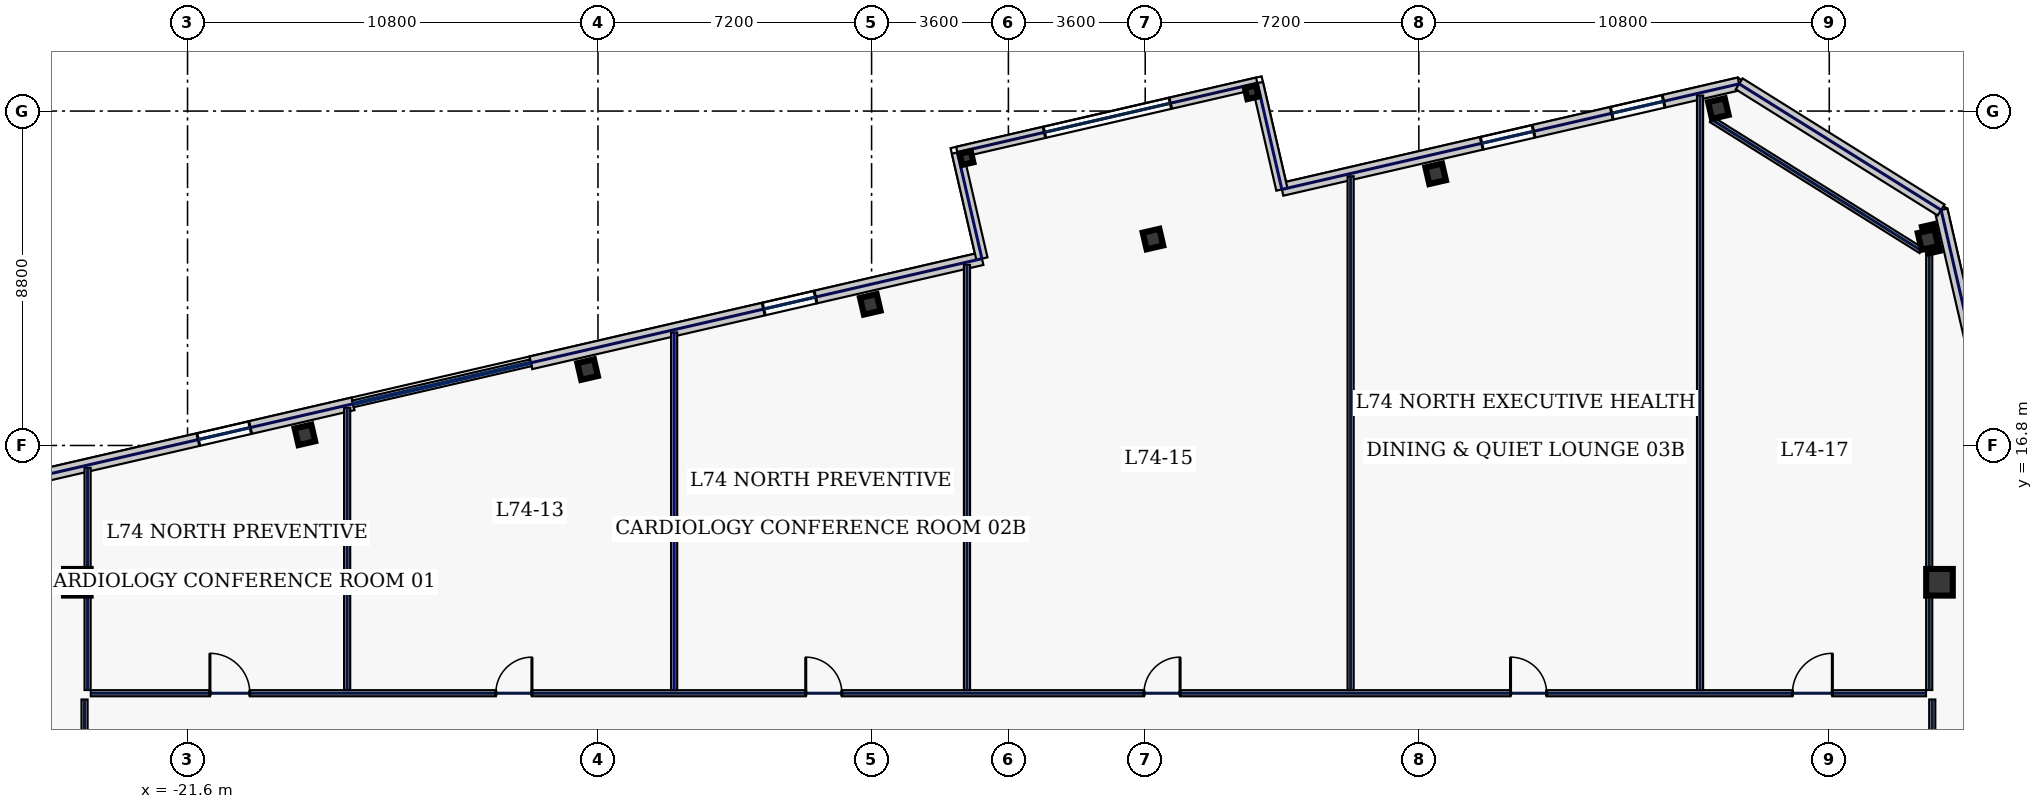
"""IFC4 building model, lengths in metres.
Left out: names, types, materials, properties, quantities, classifications, styles, units other than length and angle.
Written with IfcOpenShell. Run it as: python <this file> out.ifc"""

import sys

from ifc_helpers import new_model, si_unit, direction, frame, frame_2d, origin, origin_2d, place, context, subcontext, project, spatial, rectangle, hollow_rectangle, extrude, element, fill, save


model = new_model("IFC4")
c1 = context("Model", 3, precision=1e-05, world=origin(), true_north=direction((0.0, 1.0)))
c2 = subcontext(c1, "Body", "Model", "MODEL_VIEW")
j1 = project(units=[si_unit("LENGTHUNIT", "METRE"), si_unit("PLANEANGLEUNIT", "RADIAN")], contexts=[c1])
p1 = place(None, origin())
s1 = spatial("IfcSite", under=j1, at=p1, CompositionType="ELEMENT")
p2 = place(p1, origin())
s2 = spatial("IfcBuilding", under=s1, at=p2, CompositionType="ELEMENT")
p3 = place(p2, frame((0.0, 0.0, 317.0)))
s3 = spatial("IfcBuildingStorey", under=s2, at=p3, CompositionType="ELEMENT", Elevation=317.0)
for number, where, z_axis, x_axis in (
    (1, (-24.5, 13.2, 0.0), (0.0, 0.0, 1.0), (1.0, 0.0, 0.0)),
    (2, (24.5, 13.2, 0.0), (0.0, 0.0, 1.0), (1.0, 0.0, 0.0)),
):
    element("IfcColumn", number, at=place(p3, frame(where, z_axis=z_axis, x_axis=x_axis)), inside=s3, PredefinedType="COLUMN", context=c2, shape_type="SweptSolid", body=[
        extrude(hollow_rectangle(XDim=0.7, YDim=0.7, WallThickness=0.032, at=origin_2d()), origin(), (0.0, 0.0, 1.0), 3.74),
    ])
for number, where, z_axis, x_axis in (
    (3, (18.682, 25.666, 0.0), (0.0, 0.0, 1.0), (0.974, 0.225, 0.0)),
    (4, (11.243, 23.949, 0.0), (0.0, 0.0, 1.0), (0.974, 0.225, 0.0)),
    (5, (3.804, 22.232, 0.0), (0.0, 0.0, 1.0), (0.974, 0.225, 0.0)),
    (6, (-3.634, 20.514, 0.0), (0.0, 0.0, 1.0), (0.974, 0.225, 0.0)),
    (7, (-11.073, 18.797, 0.0), (0.0, 0.0, 1.0), (0.974, 0.225, 0.0)),
    (8, (-18.511, 17.08, 0.0), (0.0, 0.0, 1.0), (0.974, 0.225, 0.0)),
    (9, (24.198, 22.219, 0.0), (0.0, 0.0, 1.0), (0.974, 0.225, 0.0)),
):
    element("IfcColumn", number, at=place(p3, frame(where, z_axis=z_axis, x_axis=x_axis)), inside=s3, PredefinedType="COLUMN", context=c2, shape_type="SweptSolid", body=[
        extrude(hollow_rectangle(XDim=0.45, YDim=0.45, WallThickness=0.022, at=origin_2d()), origin(), (0.0, 0.0, 1.0), 3.74),
    ])
for number, where, z_axis, x_axis in (
    (10, (-1.102, 24.363, 0.0), (0.0, 0.0, 1.0), (0.974, 0.225, 0.0)),
    (11, (6.401, 26.095, 0.0), (0.0, 0.0, 1.0), (0.974, 0.225, 0.0)),
):
    element("IfcColumn", number, at=place(p3, frame(where, z_axis=z_axis, x_axis=x_axis)), inside=s3, PredefinedType="COLUMN", context=c2, shape_type="SweptSolid", body=[
        extrude(hollow_rectangle(XDim=0.3, YDim=0.3, WallThickness=0.016, at=origin_2d()), origin(), (0.0, 0.0, 1.0), 3.74),
    ])
p4 = place(p3, frame((19.229, 26.316, 0.0), z_axis=(0.0, 0.0, 1.0), x_axis=(-0.974371201193, -0.224946131964, 0.0)))
e12 = element("IfcWall", 12, at=p4, inside=s3, PredefinedType="STANDARD", context=c2, shape_type="SweptSolid", body=[
    extrude(rectangle(XDim=12.35, YDim=0.34, at=frame_2d((6.175, 0.0))), origin(), (0.0, 0.0, 1.0), 3.74),
])
p5 = place(p4, frame((5.553, 0.0, 1.0)))
e13 = element("IfcOpeningElement", 13, at=p5, cuts=e12, PredefinedType="OPENING", context=c2, shape_type="SweptSolid", body=[
    extrude(rectangle(XDim=1.4, YDim=1.85, at=frame_2d((0.7, 0.925))), frame((0.0, 0.18, 0.0), z_axis=(0.0, -1.0, 0.0), x_axis=(1.0, 0.0, 0.0)), (0.0, 0.0, 1.0), 0.36),
])
p6 = place(p4, frame((2.041, 0.0, 1.0)))
e14 = element("IfcOpeningElement", 14, at=p6, cuts=e12, PredefinedType="OPENING", context=c2, shape_type="SweptSolid", body=[
    extrude(rectangle(XDim=1.4, YDim=1.85, at=frame_2d((0.7, 0.925))), frame((0.0, 0.18, 0.0), z_axis=(0.0, -1.0, 0.0), x_axis=(1.0, 0.0, 0.0)), (0.0, 0.0, 1.0), 0.36),
])
p7 = place(p3, frame((-0.696, 21.716, 0.0), z_axis=(0.0, 0.0, 1.0), x_axis=(-0.974367550465, -0.224961944785, 0.0)))
e15 = element("IfcWall", 15, at=p7, inside=s3, PredefinedType="STANDARD", context=c2, shape_type="SweptSolid", body=[
    extrude(rectangle(XDim=12.184, YDim=0.34, at=frame_2d((6.092, 0.0))), origin(), (0.0, 0.0, 1.0), 3.74),
])
p8 = place(p7, frame((4.494, 0.0, 1.0)))
e16 = element("IfcOpeningElement", 16, at=p8, cuts=e15, PredefinedType="OPENING", context=c2, shape_type="SweptSolid", body=[
    extrude(rectangle(XDim=1.4, YDim=1.85, at=frame_2d((0.7, 0.925))), frame((0.0, 0.18, 0.0), z_axis=(0.0, -1.0, 0.0), x_axis=(1.0, 0.0, 0.0)), (0.0, 0.0, 1.0), 0.36),
])
p9 = place(p3, frame((-17.245, 17.895, 0.0), z_axis=(0.0, 0.0, 1.0), x_axis=(-0.97437318493, -0.224937539085, 0.0)))
e17 = element("IfcWall", 17, at=p9, inside=s3, PredefinedType="STANDARD", context=c2, shape_type="SweptSolid", body=[
    extrude(rectangle(XDim=17.366, YDim=0.34, at=frame_2d((8.683, 0.0))), origin(), (0.0, 0.0, 1.0), 3.74),
])
p10 = place(p9, frame((13.925, 0.0, 1.0)))
e18 = element("IfcOpeningElement", 18, at=p10, cuts=e17, PredefinedType="OPENING", context=c2, shape_type="SweptSolid", body=[
    extrude(rectangle(XDim=1.4, YDim=1.85, at=frame_2d((0.7, 0.925))), frame((0.0, 0.18, 0.0), z_axis=(0.0, -1.0, 0.0), x_axis=(1.0, 0.0, 0.0)), (0.0, 0.0, 1.0), 0.36),
])
p11 = place(p9, frame((10.413, 0.0, 1.0)))
e19 = element("IfcOpeningElement", 19, at=p11, cuts=e17, PredefinedType="OPENING", context=c2, shape_type="SweptSolid", body=[
    extrude(rectangle(XDim=1.4, YDim=1.85, at=frame_2d((0.7, 0.925))), frame((0.0, 0.18, 0.0), z_axis=(0.0, -1.0, 0.0), x_axis=(1.0, 0.0, 0.0)), (0.0, 0.0, 1.0), 0.36),
])
p12 = place(p9, frame((2.779, 0.0, 1.0)))
e20 = element("IfcOpeningElement", 20, at=p12, cuts=e17, PredefinedType="OPENING", context=c2, shape_type="SweptSolid", body=[
    extrude(rectangle(XDim=1.4, YDim=1.85, at=frame_2d((0.7, 0.925))), frame((0.0, 0.18, 0.0), z_axis=(0.0, -1.0, 0.0), x_axis=(1.0, 0.0, 0.0)), (0.0, 0.0, 1.0), 0.36),
])
p13 = place(p3, frame((32.686, -12.276, 0.0), z_axis=(0.0, 0.0, 1.0), x_axis=(-0.224953091034, 0.974369594576, 0.0)))
e21 = element("IfcWall", 21, at=p13, inside=s3, PredefinedType="STANDARD", context=c2, shape_type="SweptSolid", body=[
    extrude(rectangle(XDim=36.2, YDim=0.34, at=frame_2d((18.1, 0.0))), origin(), (0.0, 0.0, 1.0), 3.74),
])
p14 = place(p13, frame((3.725, 0.0, 0.58)))
e22 = element("IfcOpeningElement", 22, at=p14, cuts=e21, PredefinedType="OPENING", context=c2, shape_type="SweptSolid", body=[
    extrude(rectangle(XDim=1.6, YDim=2.3, at=frame_2d((0.8, 1.15))), frame((0.0, 0.18, 0.0), z_axis=(0.0, -1.0, 0.0), x_axis=(1.0, 0.0, 0.0)), (0.0, 0.0, 1.0), 0.36),
])
p15 = place(p13, frame((12.775, 0.0, 0.58)))
e23 = element("IfcOpeningElement", 23, at=p15, cuts=e21, PredefinedType="OPENING", context=c2, shape_type="SweptSolid", body=[
    extrude(rectangle(XDim=1.6, YDim=2.3, at=frame_2d((0.8, 1.15))), frame((0.0, 0.18, 0.0), z_axis=(0.0, -1.0, 0.0), x_axis=(1.0, 0.0, 0.0)), (0.0, 0.0, 1.0), 0.36),
])
p16 = place(p13, frame((21.825, 0.0, 0.58)))
e24 = element("IfcOpeningElement", 24, at=p16, cuts=e21, PredefinedType="OPENING", context=c2, shape_type="SweptSolid", body=[
    extrude(rectangle(XDim=1.6, YDim=2.3, at=frame_2d((0.8, 1.15))), frame((0.0, 0.18, 0.0), z_axis=(0.0, -1.0, 0.0), x_axis=(1.0, 0.0, 0.0)), (0.0, 0.0, 1.0), 0.36),
])
p17 = place(p13, frame((30.875, 0.0, 0.58)))
e25 = element("IfcOpeningElement", 25, at=p17, cuts=e21, PredefinedType="OPENING", context=c2, shape_type="SweptSolid", body=[
    extrude(rectangle(XDim=1.6, YDim=2.3, at=frame_2d((0.8, 1.15))), frame((0.0, 0.18, 0.0), z_axis=(0.0, -1.0, 0.0), x_axis=(1.0, 0.0, 0.0)), (0.0, 0.0, 1.0), 0.36),
])
p18 = place(p3, frame((24.542, 22.996, 0.0), z_axis=(0.0, 0.0, 1.0), x_axis=(-0.848055220921, 0.529907862057, 0.0)))
e26 = element("IfcWall", 26, at=p18, inside=s3, PredefinedType="STANDARD", context=c2, shape_type="SweptSolid", body=[
    extrude(rectangle(XDim=6.265, YDim=0.34, at=frame_2d((3.132, 0.0))), origin(), (0.0, 0.0, 1.0), 3.74),
])
for number, where, z_axis, x_axis in (
    (27, (-0.696, 21.716, 0.0), (0.0, 0.0, 1.0), (-0.225, 0.974, 0.0)),
    (28, (7.196, 23.538, 0.0), (0.0, 0.0, 1.0), (-0.225, 0.974, 0.0)),
):
    element("IfcWall", number, at=place(p3, frame(where, z_axis=z_axis, x_axis=x_axis)), inside=s3, PredefinedType="STANDARD", context=c2, shape_type="SweptSolid", body=[
        extrude(rectangle(XDim=2.87, YDim=0.3, at=frame_2d((1.435, 0.0))), origin(), (0.0, 0.0, 1.0), 3.74),
    ])
p19 = place(p3, frame((-1.342, 24.512, 0.0), z_axis=(0.0, 0.0, 1.0), x_axis=(0.974371888243, 0.224943155936, 0.0)))
e29 = element("IfcWall", 29, at=p19, inside=s3, PredefinedType="STANDARD", context=c2, shape_type="SweptSolid", body=[
    extrude(rectangle(XDim=8.1, YDim=0.3, at=frame_2d((4.05, 0.0))), origin(), (0.0, 0.0, 1.0), 3.385),
])
p20 = place(p19, frame((2.35, 0.0, 0.68)))
e30 = element("IfcOpeningElement", 30, at=p20, cuts=e29, PredefinedType="OPENING", context=c2, shape_type="SweptSolid", body=[
    extrude(rectangle(XDim=3.4, YDim=2.35, at=frame_2d((1.7, 1.175))), frame((0.0, 0.16, 0.0), z_axis=(0.0, -1.0, 0.0), x_axis=(1.0, 0.0, 0.0)), (0.0, 0.0, 1.0), 0.32),
])
p21 = place(p3, frame((24.018, 21.931, 0.0), z_axis=(0.0, 0.0, 1.0), x_axis=(-0.848051009591, 0.529914601736, 0.0)))
e31 = element("IfcWall", 31, at=p21, inside=s3, PredefinedType="PARTITIONING", context=c2, shape_type="SweptSolid", body=[
    extrude(rectangle(XDim=6.505, YDim=0.16, at=frame_2d((3.253, 0.0))), origin(), (0.0, 0.0, 1.0), 3.74),
])
p22 = place(p3, frame((-24.31, -10.015, 0.0), z_axis=(0.0, 0.0, 1.0), x_axis=(0.0, 1.0, 0.0)))
e32 = element("IfcWall", 32, at=p22, inside=s3, PredefinedType="PARTITIONING", context=c2, shape_type="SweptSolid", body=[
    extrude(rectangle(XDim=20.13, YDim=0.16, at=frame_2d((10.065, 0.0))), origin(), (0.0, 0.0, 1.0), 3.74),
])
p23 = place(p22, frame((2.169, 0.0, 0.0)))
e33 = element("IfcOpeningElement", 33, at=p23, cuts=e32, PredefinedType="OPENING", context=c2, shape_type="SweptSolid", body=[
    extrude(rectangle(XDim=0.95, YDim=2.2, at=frame_2d((0.475, 1.1))), frame((0.0, 0.09, 0.0), z_axis=(0.0, -1.0, 0.0), x_axis=(1.0, 0.0, 0.0)), (0.0, 0.0, 1.0), 0.18),
])
p24 = place(p22, frame((6.4, 0.0, 0.0)))
e34 = element("IfcOpeningElement", 34, at=p24, cuts=e32, PredefinedType="OPENING", context=c2, shape_type="SweptSolid", body=[
    extrude(rectangle(XDim=0.95, YDim=2.2, at=frame_2d((0.475, 1.1))), frame((0.0, 0.09, 0.0), z_axis=(0.0, -1.0, 0.0), x_axis=(1.0, 0.0, 0.0)), (0.0, 0.0, 1.0), 0.18),
])
p25 = place(p22, frame((11.6, 0.0, 0.0)))
e35 = element("IfcOpeningElement", 35, at=p25, cuts=e32, PredefinedType="OPENING", context=c2, shape_type="SweptSolid", body=[
    extrude(rectangle(XDim=0.95, YDim=2.2, at=frame_2d((0.475, 1.1))), frame((0.0, 0.09, 0.0), z_axis=(0.0, -1.0, 0.0), x_axis=(1.0, 0.0, 0.0)), (0.0, 0.0, 1.0), 0.18),
])
p26 = place(p22, frame((17.131, 0.0, 0.0)))
e36 = element("IfcOpeningElement", 36, at=p26, cuts=e32, PredefinedType="OPENING", context=c2, shape_type="SweptSolid", body=[
    extrude(rectangle(XDim=0.95, YDim=2.2, at=frame_2d((0.475, 1.1))), frame((0.0, 0.09, 0.0), z_axis=(0.0, -1.0, 0.0), x_axis=(1.0, 0.0, 0.0)), (0.0, 0.0, 1.0), 0.18),
])
p27 = place(p3, frame((-24.145, 10.28, 0.0), z_axis=(0.0, 0.0, 1.0), x_axis=(1.0, 0.0, 0.0)))
e37 = element("IfcWall", 37, at=p27, inside=s3, PredefinedType="PARTITIONING", context=c2, shape_type="SweptSolid", body=[
    extrude(rectangle(XDim=48.29, YDim=0.16, at=frame_2d((24.145, 0.0))), origin(), (0.0, 0.0, 1.0), 3.74),
])
p28 = place(p27, frame((3.134, 0.0, 0.0)))
e38 = element("IfcOpeningElement", 38, at=p28, cuts=e37, PredefinedType="OPENING", context=c2, shape_type="SweptSolid", body=[
    extrude(rectangle(XDim=1.05, YDim=2.2, at=frame_2d((0.525, 1.1))), frame((0.0, 0.09, 0.0), z_axis=(0.0, -1.0, 0.0), x_axis=(1.0, 0.0, 0.0)), (0.0, 0.0, 1.0), 0.18),
])
p29 = place(p27, frame((10.657, 0.0, 0.0)))
e39 = element("IfcOpeningElement", 39, at=p29, cuts=e37, PredefinedType="OPENING", context=c2, shape_type="SweptSolid", body=[
    extrude(rectangle(XDim=0.95, YDim=2.2, at=frame_2d((0.475, 1.1))), frame((0.0, 0.09, 0.0), z_axis=(0.0, -1.0, 0.0), x_axis=(1.0, 0.0, 0.0)), (0.0, 0.0, 1.0), 0.18),
])
p30 = place(p27, frame((18.812, 0.0, 0.0)))
e40 = element("IfcOpeningElement", 40, at=p30, cuts=e37, PredefinedType="OPENING", context=c2, shape_type="SweptSolid", body=[
    extrude(rectangle(XDim=0.95, YDim=2.2, at=frame_2d((0.475, 1.1))), frame((0.0, 0.09, 0.0), z_axis=(0.0, -1.0, 0.0), x_axis=(1.0, 0.0, 0.0)), (0.0, 0.0, 1.0), 0.18),
])
p31 = place(p27, frame((27.712, 0.0, 0.0)))
e41 = element("IfcOpeningElement", 41, at=p31, cuts=e37, PredefinedType="OPENING", context=c2, shape_type="SweptSolid", body=[
    extrude(rectangle(XDim=0.95, YDim=2.2, at=frame_2d((0.475, 1.1))), frame((0.0, 0.09, 0.0), z_axis=(0.0, -1.0, 0.0), x_axis=(1.0, 0.0, 0.0)), (0.0, 0.0, 1.0), 0.18),
])
p32 = place(p27, frame((37.357, 0.0, 0.0)))
e42 = element("IfcOpeningElement", 42, at=p32, cuts=e37, PredefinedType="OPENING", context=c2, shape_type="SweptSolid", body=[
    extrude(rectangle(XDim=0.95, YDim=2.2, at=frame_2d((0.475, 1.1))), frame((0.0, 0.09, 0.0), z_axis=(0.0, -1.0, 0.0), x_axis=(1.0, 0.0, 0.0)), (0.0, 0.0, 1.0), 0.18),
])
p33 = place(p27, frame((44.776, 0.0, 0.0)))
e43 = element("IfcOpeningElement", 43, at=p33, cuts=e37, PredefinedType="OPENING", context=c2, shape_type="SweptSolid", body=[
    extrude(rectangle(XDim=1.05, YDim=2.2, at=frame_2d((0.525, 1.1))), frame((0.0, 0.09, 0.0), z_axis=(0.0, -1.0, 0.0), x_axis=(1.0, 0.0, 0.0)), (0.0, 0.0, 1.0), 0.18),
])
p34 = place(p3, frame((24.31, 10.115, 0.0), z_axis=(0.0, 0.0, 1.0), x_axis=(0.0, -1.0, 0.0)))
e44 = element("IfcWall", 44, at=p34, inside=s3, PredefinedType="PARTITIONING", context=c2, shape_type="SweptSolid", body=[
    extrude(rectangle(XDim=20.13, YDim=0.16, at=frame_2d((10.065, 0.0))), origin(), (0.0, 0.0, 1.0), 3.74),
])
p35 = place(p34, frame((15.206, 0.0, 0.0)))
e45 = element("IfcOpeningElement", 45, at=p35, cuts=e44, PredefinedType="OPENING", context=c2, shape_type="SweptSolid", body=[
    extrude(rectangle(XDim=0.95, YDim=2.2, at=frame_2d((0.475, 1.1))), frame((0.0, 0.09, 0.0), z_axis=(0.0, -1.0, 0.0), x_axis=(1.0, 0.0, 0.0)), (0.0, 0.0, 1.0), 0.18),
])
p36 = place(p34, frame((5.444, 0.0, 0.0)))
e46 = element("IfcOpeningElement", 46, at=p36, cuts=e44, PredefinedType="OPENING", context=c2, shape_type="SweptSolid", body=[
    extrude(rectangle(XDim=0.95, YDim=2.2, at=frame_2d((0.475, 1.1))), frame((0.0, 0.09, 0.0), z_axis=(0.0, -1.0, 0.0), x_axis=(1.0, 0.0, 0.0)), (0.0, 0.0, 1.0), 0.18),
])
p37 = place(p3, frame((-24.23, 10.365, 0.0), z_axis=(0.0, 0.0, 1.0), x_axis=(0.0, 1.0, 0.0)))
e47 = element("IfcWall", 47, at=p37, inside=s3, PredefinedType="PARTITIONING", context=c2, shape_type="SweptSolid", body=[
    extrude(rectangle(XDim=5.846, YDim=0.16, at=frame_2d((2.923, 0.0))), origin(), (0.0, 0.0, 1.0), 3.74),
])
p38 = place(p3, frame((24.23, 10.365, 0.0), z_axis=(0.0, 0.0, 1.0), x_axis=(0.0, 1.0, 0.0)))
e48 = element("IfcWall", 48, at=p38, inside=s3, PredefinedType="PARTITIONING", context=c2, shape_type="SweptSolid", body=[
    extrude(rectangle(XDim=12.206, YDim=0.16, at=frame_2d((6.103, 0.0))), origin(), (0.0, 0.0, 1.0), 3.185),
])
p39 = place(p3, frame((-17.4, 10.365, 0.0), z_axis=(0.0, 0.0, 1.0), x_axis=(0.0, 1.0, 0.0)))
e49 = element("IfcWall", 49, at=p39, inside=s3, PredefinedType="PARTITIONING", context=c2, shape_type="SweptSolid", body=[
    extrude(rectangle(XDim=7.423, YDim=0.16, at=frame_2d((3.711, 0.0))), origin(), (0.0, 0.0, 1.0), 3.74),
])
p40 = place(p3, frame((-1.09, 10.365, 0.0), z_axis=(0.0, 0.0, 1.0), x_axis=(0.0, 1.0, 0.0)))
e50 = element("IfcWall", 50, at=p40, inside=s3, PredefinedType="PARTITIONING", context=c2, shape_type="SweptSolid", body=[
    extrude(rectangle(XDim=11.188, YDim=0.16, at=frame_2d((5.594, 0.0))), origin(), (0.0, 0.0, 1.0), 3.74),
])
p41 = place(p3, frame((18.2, 10.365, 0.0), z_axis=(0.0, 0.0, 1.0), x_axis=(0.0, 1.0, 0.0)))
e51 = element("IfcWall", 51, at=p41, inside=s3, PredefinedType="PARTITIONING", context=c2, shape_type="SweptSolid", body=[
    extrude(rectangle(XDim=15.642, YDim=0.16, at=frame_2d((7.821, 0.0))), origin(), (0.0, 0.0, 1.0), 3.74),
])
p42 = place(p3, frame((-8.795, 10.365, 0.0), z_axis=(0.0, 0.0, 1.0), x_axis=(0.0, 1.0, 0.0)))
e52 = element("IfcWall", 52, at=p42, inside=s3, PredefinedType="PARTITIONING", context=c2, shape_type="SweptSolid", body=[
    extrude(rectangle(XDim=9.409, YDim=0.16, at=frame_2d((4.705, 0.0))), origin(), (0.0, 0.0, 1.0), 3.165),
])
p43 = place(p3, frame((9.005, 10.365, 0.0), z_axis=(0.0, 0.0, 1.0), x_axis=(0.0, 1.0, 0.0)))
e53 = element("IfcWall", 53, at=p43, inside=s3, PredefinedType="PARTITIONING", context=c2, shape_type="SweptSolid", body=[
    extrude(rectangle(XDim=13.519, YDim=0.16, at=frame_2d((6.759, 0.0))), origin(), (0.0, 0.0, 1.0), 3.74),
])
p44 = place(p5, origin())
e54 = element("IfcWindow", 54, at=p44, inside=s3, PartitioningType="SINGLE_PANEL", PredefinedType="WINDOW", context=c2, shape_type="SweptSolid", body=[
    extrude(rectangle(XDim=1.4, YDim=1.85, at=frame_2d((0.7, 0.925))), frame((0.0, 0.03, 0.0), z_axis=(0.0, -1.0, 0.0), x_axis=(1.0, 0.0, 0.0)), (0.0, 0.0, 1.0), 0.06),
])
fill(e13, e54)
p45 = place(p6, origin())
e55 = element("IfcWindow", 55, at=p45, inside=s3, PartitioningType="SINGLE_PANEL", PredefinedType="WINDOW", context=c2, shape_type="SweptSolid", body=[
    extrude(rectangle(XDim=1.4, YDim=1.85, at=frame_2d((0.7, 0.925))), frame((0.0, 0.03, 0.0), z_axis=(0.0, -1.0, 0.0), x_axis=(1.0, 0.0, 0.0)), (0.0, 0.0, 1.0), 0.06),
])
fill(e14, e55)
p46 = place(p8, origin())
e56 = element("IfcWindow", 56, at=p46, inside=s3, PartitioningType="SINGLE_PANEL", PredefinedType="WINDOW", context=c2, shape_type="SweptSolid", body=[
    extrude(rectangle(XDim=1.4, YDim=1.85, at=frame_2d((0.7, 0.925))), frame((0.0, 0.03, 0.0), z_axis=(0.0, -1.0, 0.0), x_axis=(1.0, 0.0, 0.0)), (0.0, 0.0, 1.0), 0.06),
])
fill(e16, e56)
p47 = place(p12, origin())
e57 = element("IfcWindow", 57, at=p47, inside=s3, PartitioningType="SINGLE_PANEL", PredefinedType="WINDOW", context=c2, shape_type="SweptSolid", body=[
    extrude(rectangle(XDim=1.4, YDim=1.85, at=frame_2d((0.7, 0.925))), frame((0.0, 0.03, 0.0), z_axis=(0.0, -1.0, 0.0), x_axis=(1.0, 0.0, 0.0)), (0.0, 0.0, 1.0), 0.06),
])
fill(e20, e57)
p48 = place(p20, origin())
e58 = element("IfcWindow", 58, at=p48, inside=s3, PartitioningType="SINGLE_PANEL", PredefinedType="WINDOW", context=c2, shape_type="SweptSolid", body=[
    extrude(rectangle(XDim=3.4, YDim=2.35, at=frame_2d((1.7, 1.175))), frame((0.0, 0.03, 0.0), z_axis=(0.0, -1.0, 0.0), x_axis=(1.0, 0.0, 0.0)), (0.0, 0.0, 1.0), 0.06),
])
fill(e30, e58)
p49 = place(p28, origin())
e59 = element("IfcDoor", 59, at=p49, inside=s3, OperationType="SINGLE_SWING_LEFT", PredefinedType="DOOR", context=c2, shape_type="SweptSolid", body=[
    extrude(rectangle(XDim=1.05, YDim=2.2, at=frame_2d((0.525, 1.1))), frame((0.0, 0.025, 0.0), z_axis=(0.0, -1.0, 0.0), x_axis=(1.0, 0.0, 0.0)), (0.0, 0.0, 1.0), 0.05),
])
fill(e38, e59)
p50 = place(p29, origin())
e60 = element("IfcDoor", 60, at=p50, inside=s3, OperationType="SINGLE_SWING_RIGHT", PredefinedType="DOOR", context=c2, shape_type="SweptSolid", body=[
    extrude(rectangle(XDim=0.95, YDim=2.2, at=frame_2d((0.475, 1.1))), frame((0.0, 0.025, 0.0), z_axis=(0.0, -1.0, 0.0), x_axis=(1.0, 0.0, 0.0)), (0.0, 0.0, 1.0), 0.05),
])
fill(e39, e60)
p51 = place(p30, origin())
e61 = element("IfcDoor", 61, at=p51, inside=s3, OperationType="SINGLE_SWING_LEFT", PredefinedType="DOOR", context=c2, shape_type="SweptSolid", body=[
    extrude(rectangle(XDim=0.95, YDim=2.2, at=frame_2d((0.475, 1.1))), frame((0.0, 0.025, 0.0), z_axis=(0.0, -1.0, 0.0), x_axis=(1.0, 0.0, 0.0)), (0.0, 0.0, 1.0), 0.05),
])
fill(e40, e61)
p52 = place(p31, origin())
e62 = element("IfcDoor", 62, at=p52, inside=s3, OperationType="SINGLE_SWING_RIGHT", PredefinedType="DOOR", context=c2, shape_type="SweptSolid", body=[
    extrude(rectangle(XDim=0.95, YDim=2.2, at=frame_2d((0.475, 1.1))), frame((0.0, 0.025, 0.0), z_axis=(0.0, -1.0, 0.0), x_axis=(1.0, 0.0, 0.0)), (0.0, 0.0, 1.0), 0.05),
])
fill(e41, e62)
p53 = place(p32, origin())
e63 = element("IfcDoor", 63, at=p53, inside=s3, OperationType="SINGLE_SWING_LEFT", PredefinedType="DOOR", context=c2, shape_type="SweptSolid", body=[
    extrude(rectangle(XDim=0.95, YDim=2.2, at=frame_2d((0.475, 1.1))), frame((0.0, 0.025, 0.0), z_axis=(0.0, -1.0, 0.0), x_axis=(1.0, 0.0, 0.0)), (0.0, 0.0, 1.0), 0.05),
])
fill(e42, e63)
p54 = place(p33, origin())
e64 = element("IfcDoor", 64, at=p54, inside=s3, OperationType="SINGLE_SWING_RIGHT", PredefinedType="DOOR", context=c2, shape_type="SweptSolid", body=[
    extrude(rectangle(XDim=1.05, YDim=2.2, at=frame_2d((0.525, 1.1))), frame((0.0, 0.025, 0.0), z_axis=(0.0, -1.0, 0.0), x_axis=(1.0, 0.0, 0.0)), (0.0, 0.0, 1.0), 0.05),
])
fill(e43, e64)
save(model, sys.argv[1])
